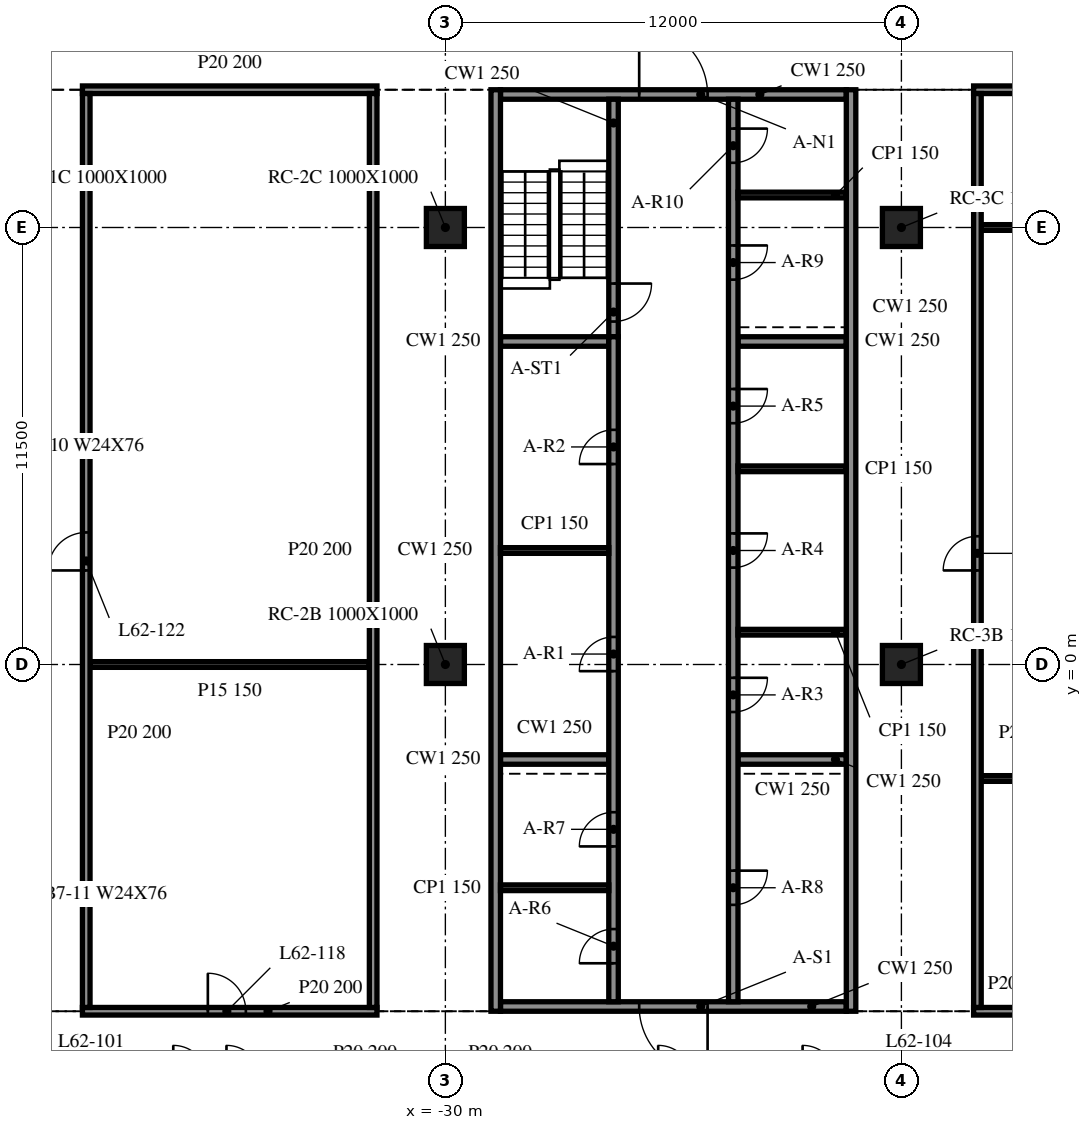
"""IFC4 building model, lengths in metres.
Left out: names, types, materials, properties, quantities, classifications, styles, units other than length and angle.
Written with IfcOpenShell. Run it as: python <this file> out.ifc"""

import sys

from ifc_helpers import new_model, si_unit, direction, frame, frame_2d, origin, origin_2d, place, context, subcontext, project, spatial, rectangle, extrude, element, fill, save


model = new_model("IFC4")
c1 = context("Model", 3, precision=1e-05, world=origin(), true_north=direction((0.0, 1.0)))
c2 = subcontext(c1, "Body", "Model", "MODEL_VIEW")
j1 = project(units=[si_unit("LENGTHUNIT", "METRE"), si_unit("PLANEANGLEUNIT", "RADIAN")], contexts=[c1])
p1 = place(None, origin())
s1 = spatial("IfcSite", under=j1, at=p1, CompositionType="ELEMENT")
p2 = place(p1, origin())
s2 = spatial("IfcBuilding", under=s1, at=p2, CompositionType="ELEMENT")
p3 = place(p2, frame((0.0, 0.0, 255.2)))
s3 = spatial("IfcBuildingStorey", under=s2, at=p3, CompositionType="ELEMENT", Elevation=255.2)
for number, where, z_axis, x_axis in (
    (1, (-30.0, 0.0, -0.34), (0.0, 0.0, 1.0), (1.0, 0.0, 0.0)),
    (2, (-30.0, 11.5, -0.34), (0.0, 0.0, 1.0), (1.0, 0.0, 0.0)),
    (3, (-18.0, 0.0, -0.34), (0.0, 0.0, 1.0), (1.0, 0.0, 0.0)),
    (4, (-18.0, 11.5, -0.34), (0.0, 0.0, 1.0), (1.0, 0.0, 0.0)),
):
    element("IfcColumn", number, at=place(p3, frame(where, z_axis=z_axis, x_axis=x_axis)), inside=s3, PredefinedType="COLUMN", context=c2, shape_type="SweptSolid", body=[
        extrude(rectangle(XDim=1.0, YDim=1.0, at=origin_2d()), origin(), (0.0, 0.0, 1.0), 3.74),
    ])
for number, where, z_axis, x_axis in (
    (5, (-28.675, 15.125, 0.0), (0.0, 0.0, 1.0), (0.0, -1.0, 0.0)),
    (6, (-19.325, -9.125, 0.0), (0.0, 0.0, 1.0), (0.0, 1.0, 0.0)),
):
    element("IfcWall", number, at=place(p3, frame(where, z_axis=z_axis, x_axis=x_axis)), inside=s3, PredefinedType="SOLIDWALL", context=c2, shape_type="SweptSolid", body=[
        extrude(rectangle(XDim=24.25, YDim=0.25, at=frame_2d((12.125, 0.0))), origin(), (0.0, 0.0, 1.0), 3.4),
    ])
p4 = place(p3, frame((-19.45, -9.0, 0.0), z_axis=(0.0, 0.0, 1.0), x_axis=(-1.0, 0.0, 0.0)))
e7 = element("IfcWall", 7, at=p4, inside=s3, PredefinedType="SOLIDWALL", context=c2, shape_type="SweptSolid", body=[
    extrude(rectangle(XDim=9.1, YDim=0.25, at=frame_2d((4.55, 0.0))), origin(), (0.0, 0.0, 1.0), 3.4),
])
p5 = place(p4, frame((3.65, 0.0, 0.0)))
e8 = element("IfcOpeningElement", 8, at=p5, cuts=e7, PredefinedType="OPENING", context=c2, shape_type="SweptSolid", body=[
    extrude(rectangle(XDim=1.8, YDim=2.1, at=frame_2d((0.9, 1.05))), frame((0.0, 0.135, 0.0), z_axis=(0.0, -1.0, 0.0), x_axis=(1.0, 0.0, 0.0)), (0.0, 0.0, 1.0), 0.27),
])
p6 = place(p3, frame((-28.55, 15.0, 0.0), z_axis=(0.0, 0.0, 1.0), x_axis=(1.0, 0.0, 0.0)))
e9 = element("IfcWall", 9, at=p6, inside=s3, PredefinedType="SOLIDWALL", context=c2, shape_type="SweptSolid", body=[
    extrude(rectangle(XDim=9.1, YDim=0.25, at=frame_2d((4.55, 0.0))), origin(), (0.0, 0.0, 1.0), 3.4),
])
p7 = place(p6, frame((3.65, 0.0, 0.0)))
e10 = element("IfcOpeningElement", 10, at=p7, cuts=e9, PredefinedType="OPENING", context=c2, shape_type="SweptSolid", body=[
    extrude(rectangle(XDim=1.8, YDim=2.1, at=frame_2d((0.9, 1.05))), frame((0.0, 0.135, 0.0), z_axis=(0.0, -1.0, 0.0), x_axis=(1.0, 0.0, 0.0)), (0.0, 0.0, 1.0), 0.27),
])
p8 = place(p3, frame((-25.575, -8.875, 0.0), z_axis=(0.0, 0.0, 1.0), x_axis=(0.0, 1.0, 0.0)))
e11 = element("IfcWall", 11, at=p8, inside=s3, PredefinedType="SOLIDWALL", context=c2, shape_type="SweptSolid", body=[
    extrude(rectangle(XDim=17.5, YDim=0.25, at=frame_2d((8.75, 0.0))), origin(), (0.0, 0.0, 1.0), 3.4),
])
p9 = place(p8, frame((8.7, 0.0, 0.0)))
e12 = element("IfcOpeningElement", 12, at=p9, cuts=e11, PredefinedType="OPENING", context=c2, shape_type="SweptSolid", body=[
    extrude(rectangle(XDim=0.9, YDim=2.1, at=frame_2d((0.45, 1.05))), frame((0.0, 0.135, 0.0), z_axis=(0.0, -1.0, 0.0), x_axis=(1.0, 0.0, 0.0)), (0.0, 0.0, 1.0), 0.27),
])
p10 = place(p8, frame((14.15, 0.0, 0.0)))
e13 = element("IfcOpeningElement", 13, at=p10, cuts=e11, PredefinedType="OPENING", context=c2, shape_type="SweptSolid", body=[
    extrude(rectangle(XDim=0.9, YDim=2.1, at=frame_2d((0.45, 1.05))), frame((0.0, 0.135, 0.0), z_axis=(0.0, -1.0, 0.0), x_axis=(1.0, 0.0, 0.0)), (0.0, 0.0, 1.0), 0.27),
])
p11 = place(p8, frame((1.012, 0.0, 0.0)))
e14 = element("IfcOpeningElement", 14, at=p11, cuts=e11, PredefinedType="OPENING", context=c2, shape_type="SweptSolid", body=[
    extrude(rectangle(XDim=0.9, YDim=2.1, at=frame_2d((0.45, 1.05))), frame((0.0, 0.135, 0.0), z_axis=(0.0, -1.0, 0.0), x_axis=(1.0, 0.0, 0.0)), (0.0, 0.0, 1.0), 0.27),
])
p12 = place(p8, frame((4.087, 0.0, 0.0)))
e15 = element("IfcOpeningElement", 15, at=p12, cuts=e11, PredefinedType="OPENING", context=c2, shape_type="SweptSolid", body=[
    extrude(rectangle(XDim=0.9, YDim=2.1, at=frame_2d((0.45, 1.05))), frame((0.0, 0.135, 0.0), z_axis=(0.0, -1.0, 0.0), x_axis=(1.0, 0.0, 0.0)), (0.0, 0.0, 1.0), 0.27),
])
p13 = place(p3, frame((-25.575, 14.875, 0.0), z_axis=(0.0, 0.0, 1.0), x_axis=(0.0, -1.0, 0.0)))
e16 = element("IfcWall", 16, at=p13, inside=s3, PredefinedType="SOLIDWALL", context=c2, shape_type="SweptSolid", body=[
    extrude(rectangle(XDim=6.25, YDim=0.25, at=frame_2d((3.125, 0.0))), origin(), (0.0, 0.0, 1.0), 3.4),
])
p14 = place(p13, frame((4.85, 0.0, 0.0)))
e17 = element("IfcOpeningElement", 17, at=p14, cuts=e16, PredefinedType="OPENING", context=c2, shape_type="SweptSolid", body=[
    extrude(rectangle(XDim=1.0, YDim=2.1, at=frame_2d((0.5, 1.05))), frame((0.0, 0.135, 0.0), z_axis=(0.0, -1.0, 0.0), x_axis=(1.0, 0.0, 0.0)), (0.0, 0.0, 1.0), 0.27),
])
p15 = place(p3, frame((-22.425, 14.875, 0.0), z_axis=(0.0, 0.0, 1.0), x_axis=(0.0, -1.0, 0.0)))
e18 = element("IfcWall", 18, at=p15, inside=s3, PredefinedType="SOLIDWALL", context=c2, shape_type="SweptSolid", body=[
    extrude(rectangle(XDim=23.75, YDim=0.25, at=frame_2d((11.875, 0.0))), origin(), (0.0, 0.0, 1.0), 3.4),
])
p16 = place(p15, frame((15.225, 0.0, 0.0)))
e19 = element("IfcOpeningElement", 19, at=p16, cuts=e18, PredefinedType="OPENING", context=c2, shape_type="SweptSolid", body=[
    extrude(rectangle(XDim=0.9, YDim=2.1, at=frame_2d((0.45, 1.05))), frame((0.0, 0.135, 0.0), z_axis=(0.0, -1.0, 0.0), x_axis=(1.0, 0.0, 0.0)), (0.0, 0.0, 1.0), 0.27),
])
p17 = place(p15, frame((11.425, 0.0, 0.0)))
e20 = element("IfcOpeningElement", 20, at=p17, cuts=e18, PredefinedType="OPENING", context=c2, shape_type="SweptSolid", body=[
    extrude(rectangle(XDim=0.9, YDim=2.1, at=frame_2d((0.45, 1.05))), frame((0.0, 0.135, 0.0), z_axis=(0.0, -1.0, 0.0), x_axis=(1.0, 0.0, 0.0)), (0.0, 0.0, 1.0), 0.27),
])
p18 = place(p15, frame((7.625, 0.0, 0.0)))
e21 = element("IfcOpeningElement", 21, at=p18, cuts=e18, PredefinedType="OPENING", context=c2, shape_type="SweptSolid", body=[
    extrude(rectangle(XDim=0.9, YDim=2.1, at=frame_2d((0.45, 1.05))), frame((0.0, 0.135, 0.0), z_axis=(0.0, -1.0, 0.0), x_axis=(1.0, 0.0, 0.0)), (0.0, 0.0, 1.0), 0.27),
])
p19 = place(p15, frame((20.3, 0.0, 0.0)))
e22 = element("IfcOpeningElement", 22, at=p19, cuts=e18, PredefinedType="OPENING", context=c2, shape_type="SweptSolid", body=[
    extrude(rectangle(XDim=0.9, YDim=2.1, at=frame_2d((0.45, 1.05))), frame((0.0, 0.135, 0.0), z_axis=(0.0, -1.0, 0.0), x_axis=(1.0, 0.0, 0.0)), (0.0, 0.0, 1.0), 0.27),
])
p20 = place(p15, frame((3.847, 0.0, 0.0)))
e23 = element("IfcOpeningElement", 23, at=p20, cuts=e18, PredefinedType="OPENING", context=c2, shape_type="SweptSolid", body=[
    extrude(rectangle(XDim=0.9, YDim=2.1, at=frame_2d((0.45, 1.05))), frame((0.0, 0.135, 0.0), z_axis=(0.0, -1.0, 0.0), x_axis=(1.0, 0.0, 0.0)), (0.0, 0.0, 1.0), 0.27),
])
p21 = place(p15, frame((0.772, 0.0, 0.0)))
e24 = element("IfcOpeningElement", 24, at=p21, cuts=e18, PredefinedType="OPENING", context=c2, shape_type="SweptSolid", body=[
    extrude(rectangle(XDim=0.9, YDim=2.1, at=frame_2d((0.45, 1.05))), frame((0.0, 0.135, 0.0), z_axis=(0.0, -1.0, 0.0), x_axis=(1.0, 0.0, 0.0)), (0.0, 0.0, 1.0), 0.27),
])
for number, where, z_axis, x_axis in (
    (25, (-28.55, -2.5, 0.0), (0.0, 0.0, 1.0), (1.0, 0.0, 0.0)),
    (26, (-28.55, 8.5, 0.0), (0.0, 0.0, 1.0), (1.0, 0.0, 0.0)),
    (27, (-22.3, -2.5, 0.0), (0.0, 0.0, 1.0), (1.0, 0.0, 0.0)),
    (28, (-22.3, 8.5, 0.0), (0.0, 0.0, 1.0), (1.0, 0.0, 0.0)),
):
    element("IfcWall", number, at=place(p3, frame(where, z_axis=z_axis, x_axis=x_axis)), inside=s3, PredefinedType="SOLIDWALL", context=c2, shape_type="SweptSolid", body=[
        extrude(rectangle(XDim=2.85, YDim=0.25, at=frame_2d((1.425, 0.0))), origin(), (0.0, 0.0, 1.0), 3.4),
    ])
for number, where, z_axis, x_axis in (
    (29, (-28.55, 3.0, 0.0), (0.0, 0.0, 1.0), (1.0, 0.0, 0.0)),
    (30, (-22.3, 0.85, 0.0), (0.0, 0.0, 1.0), (1.0, 0.0, 0.0)),
    (31, (-22.3, 5.15, 0.0), (0.0, 0.0, 1.0), (1.0, 0.0, 0.0)),
    (32, (-28.55, -5.875, 0.0), (0.0, 0.0, 1.0), (1.0, 0.0, 0.0)),
    (33, (-22.3, 12.355, 0.0), (0.0, 0.0, 1.0), (1.0, 0.0, 0.0)),
):
    element("IfcWall", number, at=place(p3, frame(where, z_axis=z_axis, x_axis=x_axis)), inside=s3, PredefinedType="PARTITIONING", context=c2, shape_type="SweptSolid", body=[
        extrude(rectangle(XDim=2.85, YDim=0.15, at=frame_2d((1.425, 0.0))), origin(), (0.0, 0.0, 1.0), 3.4),
    ])
p22 = place(p3, frame((-39.55, -9.125, 0.0), z_axis=(0.0, 0.0, 1.0), x_axis=(1.0, 0.0, 0.0)))
e34 = element("IfcWall", 34, at=p22, inside=s3, PredefinedType="PARTITIONING", context=c2, shape_type="SweptSolid", body=[
    extrude(rectangle(XDim=7.75, YDim=0.2, at=frame_2d((3.875, 0.0))), origin(), (0.0, 0.0, 1.0), 3.4),
])
p23 = place(p22, frame((3.3, 0.0, 0.0)))
e35 = element("IfcOpeningElement", 35, at=p23, cuts=e34, PredefinedType="OPENING", context=c2, shape_type="SweptSolid", body=[
    extrude(rectangle(XDim=1.0, YDim=2.1, at=frame_2d((0.5, 1.05))), frame((0.0, 0.11, 0.0), z_axis=(0.0, -1.0, 0.0), x_axis=(1.0, 0.0, 0.0)), (0.0, 0.0, 1.0), 0.22),
])
p24 = place(p3, frame((-16.1, -9.125, 0.0), z_axis=(0.0, 0.0, 1.0), x_axis=(1.0, 0.0, 0.0)))
e36 = element("IfcWall", 36, at=p24, inside=s3, PredefinedType="PARTITIONING", context=c2, shape_type="SweptSolid", body=[
    extrude(rectangle(XDim=8.1, YDim=0.2, at=frame_2d((4.05, 0.0))), origin(), (0.0, 0.0, 1.0), 3.4),
])
p25 = place(p24, frame((3.5, 0.0, 0.0)))
e37 = element("IfcOpeningElement", 37, at=p25, cuts=e36, PredefinedType="OPENING", context=c2, shape_type="SweptSolid", body=[
    extrude(rectangle(XDim=0.9, YDim=2.1, at=frame_2d((0.45, 1.05))), frame((0.0, 0.11, 0.0), z_axis=(0.0, -1.0, 0.0), x_axis=(1.0, 0.0, 0.0)), (0.0, 0.0, 1.0), 0.22),
])
p26 = place(p3, frame((-15.9, -3.0, 0.0), z_axis=(0.0, 0.0, 1.0), x_axis=(1.0, 0.0, 0.0)))
e38 = element("IfcWall", 38, at=p26, inside=s3, PredefinedType="PARTITIONING", context=c2, shape_type="SweptSolid", body=[
    extrude(rectangle(XDim=7.7, YDim=0.15, at=frame_2d((3.85, 0.0))), origin(), (0.0, 0.0, 1.0), 3.4),
])
p27 = place(p3, frame((-39.35, 0.0, 0.0), z_axis=(0.0, 0.0, 1.0), x_axis=(1.0, 0.0, 0.0)))
e39 = element("IfcWall", 39, at=p27, inside=s3, PredefinedType="PARTITIONING", context=c2, shape_type="SweptSolid", body=[
    extrude(rectangle(XDim=7.35, YDim=0.15, at=frame_2d((3.675, 0.0))), origin(), (0.0, 0.0, 1.0), 2.401),
])
p28 = place(p3, frame((-15.9, 11.5, 0.0), z_axis=(0.0, 0.0, 1.0), x_axis=(1.0, 0.0, 0.0)))
e40 = element("IfcWall", 40, at=p28, inside=s3, PredefinedType="PARTITIONING", context=c2, shape_type="SweptSolid", body=[
    extrude(rectangle(XDim=7.7, YDim=0.15, at=frame_2d((3.85, 0.0))), origin(), (0.0, 0.0, 1.0), 3.4),
])
p29 = place(p3, frame((-39.55, 15.125, 0.0), z_axis=(0.0, 0.0, 1.0), x_axis=(1.0, 0.0, 0.0)))
e41 = element("IfcWall", 41, at=p29, inside=s3, PredefinedType="PARTITIONING", context=c2, shape_type="SweptSolid", body=[
    extrude(rectangle(XDim=7.75, YDim=0.2, at=frame_2d((3.875, 0.0))), origin(), (0.0, 0.0, 1.0), 3.4),
])
p30 = place(p3, frame((-16.1, 15.125, 0.0), z_axis=(0.0, 0.0, 1.0), x_axis=(1.0, 0.0, 0.0)))
e42 = element("IfcWall", 42, at=p30, inside=s3, PredefinedType="PARTITIONING", context=c2, shape_type="SweptSolid", body=[
    extrude(rectangle(XDim=8.1, YDim=0.2, at=frame_2d((4.05, 0.0))), origin(), (0.0, 0.0, 1.0), 3.4),
])
p31 = place(p30, frame((3.5, 0.0, 0.0)))
e43 = element("IfcOpeningElement", 43, at=p31, cuts=e42, PredefinedType="OPENING", context=c2, shape_type="SweptSolid", body=[
    extrude(rectangle(XDim=0.9, YDim=2.1, at=frame_2d((0.45, 1.05))), frame((0.0, 0.11, 0.0), z_axis=(0.0, -1.0, 0.0), x_axis=(1.0, 0.0, 0.0)), (0.0, 0.0, 1.0), 0.22),
])
p32 = place(p3, frame((-39.45, -9.025, 0.0), z_axis=(0.0, 0.0, 1.0), x_axis=(0.0, 1.0, 0.0)))
e44 = element("IfcWall", 44, at=p32, inside=s3, PredefinedType="PARTITIONING", context=c2, shape_type="SweptSolid", body=[
    extrude(rectangle(XDim=24.05, YDim=0.2, at=frame_2d((12.025, 0.0))), origin(), (0.0, 0.0, 1.0), 3.4),
])
p33 = place(p32, frame((11.5, 0.0, 0.0)))
e45 = element("IfcOpeningElement", 45, at=p33, cuts=e44, PredefinedType="OPENING", context=c2, shape_type="SweptSolid", body=[
    extrude(rectangle(XDim=1.0, YDim=2.1, at=frame_2d((0.5, 1.05))), frame((0.0, 0.11, 0.0), z_axis=(0.0, -1.0, 0.0), x_axis=(1.0, 0.0, 0.0)), (0.0, 0.0, 1.0), 0.22),
])
p34 = place(p3, frame((-31.9, -9.025, 0.0), z_axis=(0.0, 0.0, 1.0), x_axis=(0.0, 1.0, 0.0)))
e46 = element("IfcWall", 46, at=p34, inside=s3, PredefinedType="PARTITIONING", context=c2, shape_type="SweptSolid", body=[
    extrude(rectangle(XDim=24.05, YDim=0.2, at=frame_2d((12.025, 0.0))), origin(), (0.0, 0.0, 1.0), 3.4),
])
p35 = place(p3, frame((-16.0, -9.025, 0.0), z_axis=(0.0, 0.0, 1.0), x_axis=(0.0, 1.0, 0.0)))
e47 = element("IfcWall", 47, at=p35, inside=s3, PredefinedType="PARTITIONING", context=c2, shape_type="SweptSolid", body=[
    extrude(rectangle(XDim=24.05, YDim=0.2, at=frame_2d((12.025, 0.0))), origin(), (0.0, 0.0, 1.0), 3.4),
])
p36 = place(p35, frame((11.5, 0.0, 0.0)))
e48 = element("IfcOpeningElement", 48, at=p36, cuts=e47, PredefinedType="OPENING", context=c2, shape_type="SweptSolid", body=[
    extrude(rectangle(XDim=0.9, YDim=2.1, at=frame_2d((0.45, 1.05))), frame((0.0, 0.11, 0.0), z_axis=(0.0, -1.0, 0.0), x_axis=(1.0, 0.0, 0.0)), (0.0, 0.0, 1.0), 0.22),
])
p37 = place(p5, origin())
e49 = element("IfcDoor", 49, at=p37, inside=s3, OperationType="DOUBLE_DOOR_SINGLE_SWING", PredefinedType="DOOR", context=c2, shape_type="SweptSolid", body=[
    extrude(rectangle(XDim=1.8, YDim=2.1, at=frame_2d((0.9, 1.05))), frame((0.0, 0.025, 0.0), z_axis=(0.0, -1.0, 0.0), x_axis=(1.0, 0.0, 0.0)), (0.0, 0.0, 1.0), 0.05),
])
fill(e8, e49)
p38 = place(p7, origin())
e50 = element("IfcDoor", 50, at=p38, inside=s3, OperationType="DOUBLE_DOOR_SINGLE_SWING", PredefinedType="DOOR", context=c2, shape_type="SweptSolid", body=[
    extrude(rectangle(XDim=1.8, YDim=2.1, at=frame_2d((0.9, 1.05))), frame((0.0, 0.025, 0.0), z_axis=(0.0, -1.0, 0.0), x_axis=(1.0, 0.0, 0.0)), (0.0, 0.0, 1.0), 0.05),
])
fill(e10, e50)
p39 = place(p9, origin())
e51 = element("IfcDoor", 51, at=p39, inside=s3, OperationType="SINGLE_SWING_LEFT", PredefinedType="DOOR", context=c2, shape_type="SweptSolid", body=[
    extrude(rectangle(XDim=0.9, YDim=2.1, at=frame_2d((0.45, 1.05))), frame((0.0, 0.025, 0.0), z_axis=(0.0, -1.0, 0.0), x_axis=(1.0, 0.0, 0.0)), (0.0, 0.0, 1.0), 0.05),
])
fill(e12, e51)
p40 = place(p10, origin())
e52 = element("IfcDoor", 52, at=p40, inside=s3, OperationType="SINGLE_SWING_RIGHT", PredefinedType="DOOR", context=c2, shape_type="SweptSolid", body=[
    extrude(rectangle(XDim=0.9, YDim=2.1, at=frame_2d((0.45, 1.05))), frame((0.0, 0.025, 0.0), z_axis=(0.0, -1.0, 0.0), x_axis=(1.0, 0.0, 0.0)), (0.0, 0.0, 1.0), 0.05),
])
fill(e13, e52)
p41 = place(p16, origin())
e53 = element("IfcDoor", 53, at=p41, inside=s3, OperationType="SINGLE_SWING_LEFT", PredefinedType="DOOR", context=c2, shape_type="SweptSolid", body=[
    extrude(rectangle(XDim=0.9, YDim=2.1, at=frame_2d((0.45, 1.05))), frame((0.0, 0.025, 0.0), z_axis=(0.0, -1.0, 0.0), x_axis=(1.0, 0.0, 0.0)), (0.0, 0.0, 1.0), 0.05),
])
fill(e19, e53)
p42 = place(p17, origin())
e54 = element("IfcDoor", 54, at=p42, inside=s3, OperationType="SINGLE_SWING_RIGHT", PredefinedType="DOOR", context=c2, shape_type="SweptSolid", body=[
    extrude(rectangle(XDim=0.9, YDim=2.1, at=frame_2d((0.45, 1.05))), frame((0.0, 0.025, 0.0), z_axis=(0.0, -1.0, 0.0), x_axis=(1.0, 0.0, 0.0)), (0.0, 0.0, 1.0), 0.05),
])
fill(e20, e54)
p43 = place(p18, origin())
e55 = element("IfcDoor", 55, at=p43, inside=s3, OperationType="SINGLE_SWING_LEFT", PredefinedType="DOOR", context=c2, shape_type="SweptSolid", body=[
    extrude(rectangle(XDim=0.9, YDim=2.1, at=frame_2d((0.45, 1.05))), frame((0.0, 0.025, 0.0), z_axis=(0.0, -1.0, 0.0), x_axis=(1.0, 0.0, 0.0)), (0.0, 0.0, 1.0), 0.05),
])
fill(e21, e55)
p44 = place(p11, origin())
e56 = element("IfcDoor", 56, at=p44, inside=s3, OperationType="SINGLE_SWING_RIGHT", PredefinedType="DOOR", context=c2, shape_type="SweptSolid", body=[
    extrude(rectangle(XDim=0.9, YDim=2.1, at=frame_2d((0.45, 1.05))), frame((0.0, 0.025, 0.0), z_axis=(0.0, -1.0, 0.0), x_axis=(1.0, 0.0, 0.0)), (0.0, 0.0, 1.0), 0.05),
])
fill(e14, e56)
p45 = place(p12, origin())
e57 = element("IfcDoor", 57, at=p45, inside=s3, OperationType="SINGLE_SWING_LEFT", PredefinedType="DOOR", context=c2, shape_type="SweptSolid", body=[
    extrude(rectangle(XDim=0.9, YDim=2.1, at=frame_2d((0.45, 1.05))), frame((0.0, 0.025, 0.0), z_axis=(0.0, -1.0, 0.0), x_axis=(1.0, 0.0, 0.0)), (0.0, 0.0, 1.0), 0.05),
])
fill(e15, e57)
p46 = place(p19, origin())
e58 = element("IfcDoor", 58, at=p46, inside=s3, OperationType="SINGLE_SWING_RIGHT", PredefinedType="DOOR", context=c2, shape_type="SweptSolid", body=[
    extrude(rectangle(XDim=0.9, YDim=2.1, at=frame_2d((0.45, 1.05))), frame((0.0, 0.025, 0.0), z_axis=(0.0, -1.0, 0.0), x_axis=(1.0, 0.0, 0.0)), (0.0, 0.0, 1.0), 0.05),
])
fill(e22, e58)
p47 = place(p20, origin())
e59 = element("IfcDoor", 59, at=p47, inside=s3, OperationType="SINGLE_SWING_LEFT", PredefinedType="DOOR", context=c2, shape_type="SweptSolid", body=[
    extrude(rectangle(XDim=0.9, YDim=2.1, at=frame_2d((0.45, 1.05))), frame((0.0, 0.025, 0.0), z_axis=(0.0, -1.0, 0.0), x_axis=(1.0, 0.0, 0.0)), (0.0, 0.0, 1.0), 0.05),
])
fill(e23, e59)
p48 = place(p21, origin())
e60 = element("IfcDoor", 60, at=p48, inside=s3, OperationType="SINGLE_SWING_RIGHT", PredefinedType="DOOR", context=c2, shape_type="SweptSolid", body=[
    extrude(rectangle(XDim=0.9, YDim=2.1, at=frame_2d((0.45, 1.05))), frame((0.0, 0.025, 0.0), z_axis=(0.0, -1.0, 0.0), x_axis=(1.0, 0.0, 0.0)), (0.0, 0.0, 1.0), 0.05),
])
fill(e24, e60)
p49 = place(p14, origin())
e61 = element("IfcDoor", 61, at=p49, inside=s3, OperationType="SINGLE_SWING_LEFT", PredefinedType="DOOR", context=c2, shape_type="SweptSolid", body=[
    extrude(rectangle(XDim=1.0, YDim=2.1, at=frame_2d((0.5, 1.05))), frame((0.0, 0.025, 0.0), z_axis=(0.0, -1.0, 0.0), x_axis=(1.0, 0.0, 0.0)), (0.0, 0.0, 1.0), 0.05),
])
fill(e17, e61)
p50 = place(p23, origin())
e62 = element("IfcDoor", 62, at=p50, inside=s3, OperationType="SINGLE_SWING_LEFT", PredefinedType="DOOR", context=c2, shape_type="SweptSolid", body=[
    extrude(rectangle(XDim=1.0, YDim=2.1, at=frame_2d((0.5, 1.05))), frame((0.0, 0.025, 0.0), z_axis=(0.0, -1.0, 0.0), x_axis=(1.0, 0.0, 0.0)), (0.0, 0.0, 1.0), 0.05),
])
fill(e35, e62)
p51 = place(p36, origin())
e63 = element("IfcDoor", 63, at=p51, inside=s3, OperationType="SINGLE_SWING_RIGHT", PredefinedType="DOOR", context=c2, shape_type="SweptSolid", body=[
    extrude(rectangle(XDim=0.9, YDim=2.1, at=frame_2d((0.45, 1.05))), frame((0.0, 0.025, 0.0), z_axis=(0.0, -1.0, 0.0), x_axis=(1.0, 0.0, 0.0)), (0.0, 0.0, 1.0), 0.05),
])
fill(e48, e63)
p52 = place(p33, origin())
e64 = element("IfcDoor", 64, at=p52, inside=s3, OperationType="SINGLE_SWING_RIGHT", PredefinedType="DOOR", context=c2, shape_type="SweptSolid", body=[
    extrude(rectangle(XDim=1.0, YDim=2.1, at=frame_2d((0.5, 1.05))), frame((0.0, 0.025, 0.0), z_axis=(0.0, -1.0, 0.0), x_axis=(1.0, 0.0, 0.0)), (0.0, 0.0, 1.0), 0.05),
])
fill(e45, e64)
save(model, sys.argv[1])
